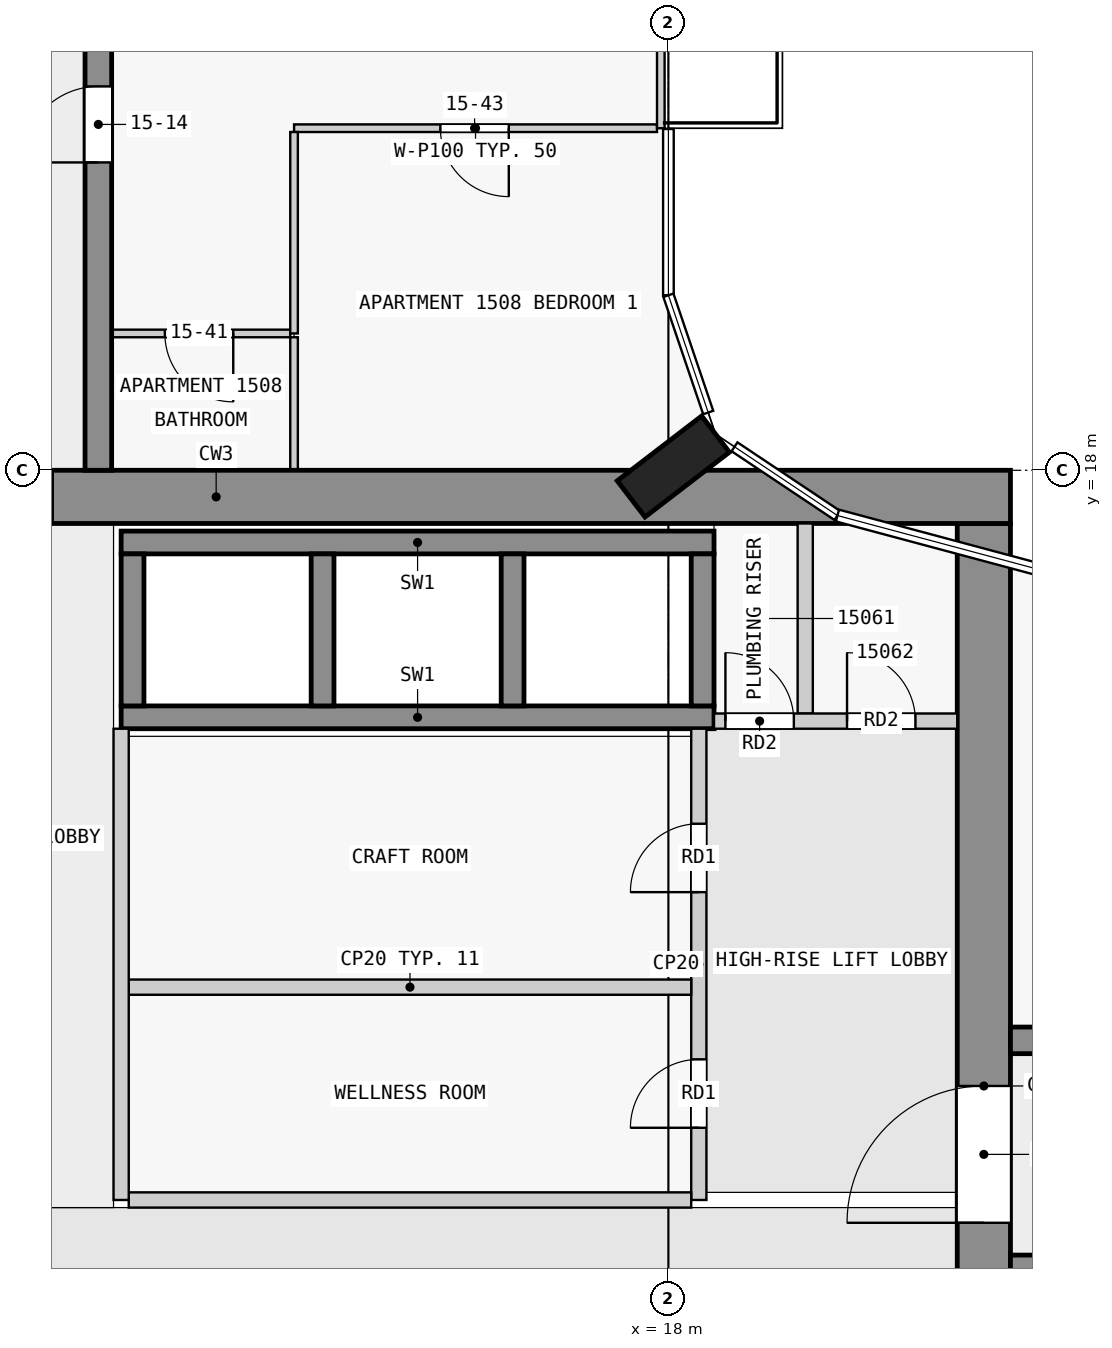
"""IFC4 building model, lengths in metres.
Left out: names, types, materials, properties, quantities, classifications, styles, units other than length and angle.
Written with IfcOpenShell. Run it as: python <this file> out.ifc"""

import sys

from ifc_helpers import new_model, si_unit, direction, frame, frame_2d, origin, origin_2d, place, context, subcontext, project, spatial, rectangle, extrude, element, fill, save


model = new_model("IFC4")
c1 = context("Model", 3, precision=1e-05, world=origin(), true_north=direction((0.0, 1.0)))
c2 = subcontext(c1, "Body", "Model", "MODEL_VIEW")
j1 = project(units=[si_unit("LENGTHUNIT", "METRE"), si_unit("PLANEANGLEUNIT", "RADIAN")], contexts=[c1])
p1 = place(None, origin())
s1 = spatial("IfcSite", under=j1, at=p1, CompositionType="ELEMENT")
p2 = place(p1, origin())
s2 = spatial("IfcBuilding", under=s1, at=p2, CompositionType="ELEMENT")
p3 = place(p2, frame((0.0, 0.0, 61.8)))
s3 = spatial("IfcBuildingStorey", under=s2, at=p3, CompositionType="ELEMENT", Elevation=61.8)
p4 = place(p3, frame((18.065, 18.05, 0.0), z_axis=(0.0, 0.0, 1.0), x_axis=(-0.608810846443, 0.793315418515, 0.0)))
e1 = element("IfcColumn", 1, at=p4, inside=s3, PredefinedType="COLUMN", context=c2, shape_type="SweptSolid", body=[
    extrude(rectangle(XDim=0.6, YDim=1.4, at=origin_2d()), origin(), (0.0, 0.0, 1.0), 3.5),
])
p5 = place(p3, frame((1.6, 17.65, 0.0), z_axis=(0.0, 0.0, 1.0), x_axis=(1.0, 0.0, 0.0)))
e2 = element("IfcWall", 2, at=p5, inside=s3, PredefinedType="SHEAR", context=c2, shape_type="SweptSolid", body=[
    extrude(rectangle(XDim=20.9, YDim=0.7, at=frame_2d((10.45, 0.0))), origin(), (0.0, 0.0, 1.0), 3.25),
])
p6 = place(p5, frame((6.5, 0.0, 0.0)))
e3 = element("IfcOpeningElement", 3, at=p6, cuts=e2, PredefinedType="OPENING", context=c2, shape_type="SweptSolid", body=[
    extrude(rectangle(XDim=1.8, YDim=2.1, at=frame_2d((0.9, 1.05))), frame((0.0, 0.36, 0.0), z_axis=(0.0, -1.0, 0.0), x_axis=(1.0, 0.0, 0.0)), (0.0, 0.0, 1.0), 0.72),
])
p7 = place(p3, frame((22.15, 2.5, 0.0), z_axis=(0.0, 0.0, 1.0), x_axis=(0.0, 1.0, 0.0)))
e4 = element("IfcWall", 4, at=p7, inside=s3, PredefinedType="SHEAR", context=c2, shape_type="SweptSolid", body=[
    extrude(rectangle(XDim=14.8, YDim=0.7, at=frame_2d((7.4, 0.0))), origin(), (0.0, 0.0, 1.0), 3.25),
])
p8 = place(p7, frame((5.6, 0.0, 0.0)))
e5 = element("IfcOpeningElement", 5, at=p8, cuts=e4, PredefinedType="OPENING", context=c2, shape_type="SweptSolid", body=[
    extrude(rectangle(XDim=1.8, YDim=2.1, at=frame_2d((0.9, 1.05))), frame((0.0, 0.36, 0.0), z_axis=(0.0, -1.0, 0.0), x_axis=(1.0, 0.0, 0.0)), (0.0, 0.0, 1.0), 0.72),
])
for number, where, z_axis, x_axis in (
    (6, (10.8, 17.05, 0.0), (0.0, 0.0, 1.0), (1.0, 0.0, 0.0)),
    (7, (10.8, 14.75, 0.0), (0.0, 0.0, 1.0), (1.0, 0.0, 0.0)),
):
    element("IfcWall", number, at=place(p3, frame(where, z_axis=z_axis, x_axis=x_axis)), inside=s3, PredefinedType="SHEAR", context=c2, shape_type="SweptSolid", body=[
        extrude(rectangle(XDim=7.8, YDim=0.3, at=frame_2d((3.9, 0.0))), origin(), (0.0, 0.0, 1.0), 3.25),
    ])
for number, where, z_axis, x_axis in (
    (8, (10.95, 14.9, 0.0), (0.0, 0.0, 1.0), (0.0, 1.0, 0.0)),
    (9, (13.45, 14.9, 0.0), (0.0, 0.0, 1.0), (0.0, 1.0, 0.0)),
    (10, (15.95, 14.9, 0.0), (0.0, 0.0, 1.0), (0.0, 1.0, 0.0)),
    (11, (18.45, 14.9, 0.0), (0.0, 0.0, 1.0), (0.0, 1.0, 0.0)),
):
    element("IfcWall", number, at=place(p3, frame(where, z_axis=z_axis, x_axis=x_axis)), inside=s3, PredefinedType="SHEAR", context=c2, shape_type="SweptSolid", body=[
        extrude(rectangle(XDim=2.0, YDim=0.3, at=frame_2d((1.0, 0.0))), origin(), (0.0, 0.0, 1.0), 3.25),
    ])
p9 = place(p3, frame((22.5, 7.5, 0.0), z_axis=(0.0, 0.0, 1.0), x_axis=(1.0, 0.0, 0.0)))
e12 = element("IfcWall", 12, at=p9, inside=s3, PredefinedType="SHEAR", context=c2, shape_type="SweptSolid", body=[
    extrude(rectangle(XDim=22.5, YDim=0.35, at=frame_2d((11.25, 0.0))), origin(), (0.0, 0.0, 1.0), 3.25),
])
p10 = place(p9, frame((1.75, 0.0, 0.0)))
e13 = element("IfcOpeningElement", 13, at=p10, cuts=e12, PredefinedType="OPENING", context=c2, shape_type="SweptSolid", body=[
    extrude(rectangle(XDim=1.0, YDim=2.1, at=frame_2d((0.5, 1.05))), frame((0.0, 0.185, 0.0), z_axis=(0.0, -1.0, 0.0), x_axis=(1.0, 0.0, 0.0)), (0.0, 0.0, 1.0), 0.37),
])
p11 = place(p9, frame((8.55, 0.0, 0.0)))
e14 = element("IfcOpeningElement", 14, at=p11, cuts=e12, PredefinedType="OPENING", context=c2, shape_type="SweptSolid", body=[
    extrude(rectangle(XDim=1.0, YDim=2.1, at=frame_2d((0.5, 1.05))), frame((0.0, 0.185, 0.0), z_axis=(0.0, -1.0, 0.0), x_axis=(1.0, 0.0, 0.0)), (0.0, 0.0, 1.0), 0.37),
])
p12 = place(p9, frame((15.25, 0.0, 0.0)))
e15 = element("IfcOpeningElement", 15, at=p12, cuts=e12, PredefinedType="OPENING", context=c2, shape_type="SweptSolid", body=[
    extrude(rectangle(XDim=1.0, YDim=2.1, at=frame_2d((0.5, 1.05))), frame((0.0, 0.185, 0.0), z_axis=(0.0, -1.0, 0.0), x_axis=(1.0, 0.0, 0.0)), (0.0, 0.0, 1.0), 0.37),
])
p13 = place(p9, frame((18.75, 0.0, 0.0)))
e16 = element("IfcOpeningElement", 16, at=p13, cuts=e12, PredefinedType="OPENING", context=c2, shape_type="SweptSolid", body=[
    extrude(rectangle(XDim=0.9, YDim=2.1, at=frame_2d((0.45, 1.05))), frame((0.0, 0.185, 0.0), z_axis=(0.0, -1.0, 0.0), x_axis=(1.0, 0.0, 0.0)), (0.0, 0.0, 1.0), 0.37),
])
p14 = place(p9, frame((20.95, 0.0, 0.0)))
e17 = element("IfcOpeningElement", 17, at=p14, cuts=e12, PredefinedType="OPENING", context=c2, shape_type="SweptSolid", body=[
    extrude(rectangle(XDim=1.0, YDim=2.1, at=frame_2d((0.5, 1.05))), frame((0.0, 0.185, 0.0), z_axis=(0.0, -1.0, 0.0), x_axis=(1.0, 0.0, 0.0)), (0.0, 0.0, 1.0), 0.37),
])
p15 = place(p3, frame((22.5, 10.5, 0.0), z_axis=(0.0, 0.0, 1.0), x_axis=(1.0, 0.0, 0.0)))
e18 = element("IfcWall", 18, at=p15, inside=s3, PredefinedType="SHEAR", context=c2, shape_type="SweptSolid", body=[
    extrude(rectangle(XDim=22.5, YDim=0.35, at=frame_2d((11.25, 0.0))), origin(), (0.0, 0.0, 1.0), 3.25),
])
p16 = place(p15, frame((1.75, 0.0, 0.0)))
e19 = element("IfcOpeningElement", 19, at=p16, cuts=e18, PredefinedType="OPENING", context=c2, shape_type="SweptSolid", body=[
    extrude(rectangle(XDim=1.0, YDim=2.1, at=frame_2d((0.5, 1.05))), frame((0.0, 0.185, 0.0), z_axis=(0.0, -1.0, 0.0), x_axis=(1.0, 0.0, 0.0)), (0.0, 0.0, 1.0), 0.37),
])
p17 = place(p15, frame((6.25, 0.0, 0.0)))
e20 = element("IfcOpeningElement", 20, at=p17, cuts=e18, PredefinedType="OPENING", context=c2, shape_type="SweptSolid", body=[
    extrude(rectangle(XDim=1.0, YDim=2.1, at=frame_2d((0.5, 1.05))), frame((0.0, 0.185, 0.0), z_axis=(0.0, -1.0, 0.0), x_axis=(1.0, 0.0, 0.0)), (0.0, 0.0, 1.0), 0.37),
])
p18 = place(p15, frame((10.75, 0.0, 0.0)))
e21 = element("IfcOpeningElement", 21, at=p18, cuts=e18, PredefinedType="OPENING", context=c2, shape_type="SweptSolid", body=[
    extrude(rectangle(XDim=1.0, YDim=2.1, at=frame_2d((0.5, 1.05))), frame((0.0, 0.185, 0.0), z_axis=(0.0, -1.0, 0.0), x_axis=(1.0, 0.0, 0.0)), (0.0, 0.0, 1.0), 0.37),
])
p19 = place(p15, frame((16.85, 0.0, 0.0)))
e22 = element("IfcOpeningElement", 22, at=p19, cuts=e18, PredefinedType="OPENING", context=c2, shape_type="SweptSolid", body=[
    extrude(rectangle(XDim=1.0, YDim=2.1, at=frame_2d((0.5, 1.05))), frame((0.0, 0.185, 0.0), z_axis=(0.0, -1.0, 0.0), x_axis=(1.0, 0.0, 0.0)), (0.0, 0.0, 1.0), 0.37),
])
p20 = place(p3, frame((10.5, 18.0, 0.0), z_axis=(0.0, 0.0, 1.0), x_axis=(0.0, 1.0, 0.0)))
e23 = element("IfcWall", 23, at=p20, inside=s3, PredefinedType="SHEAR", context=c2, shape_type="SweptSolid", body=[
    extrude(rectangle(XDim=27.0, YDim=0.35, at=frame_2d((13.5, 0.0))), origin(), (0.0, 0.0, 1.0), 3.25),
])
p21 = place(p20, frame((4.05, 0.0, 0.0)))
e24 = element("IfcOpeningElement", 24, at=p21, cuts=e23, PredefinedType="OPENING", context=c2, shape_type="SweptSolid", body=[
    extrude(rectangle(XDim=1.0, YDim=2.1, at=frame_2d((0.5, 1.05))), frame((0.0, 0.185, 0.0), z_axis=(0.0, -1.0, 0.0), x_axis=(1.0, 0.0, 0.0)), (0.0, 0.0, 1.0), 0.37),
])
p22 = place(p20, frame((10.75, 0.0, 0.0)))
e25 = element("IfcOpeningElement", 25, at=p22, cuts=e23, PredefinedType="OPENING", context=c2, shape_type="SweptSolid", body=[
    extrude(rectangle(XDim=1.0, YDim=2.1, at=frame_2d((0.5, 1.05))), frame((0.0, 0.185, 0.0), z_axis=(0.0, -1.0, 0.0), x_axis=(1.0, 0.0, 0.0)), (0.0, 0.0, 1.0), 0.37),
])
p23 = place(p20, frame((15.25, 0.0, 0.0)))
e26 = element("IfcOpeningElement", 26, at=p23, cuts=e23, PredefinedType="OPENING", context=c2, shape_type="SweptSolid", body=[
    extrude(rectangle(XDim=1.0, YDim=2.1, at=frame_2d((0.5, 1.05))), frame((0.0, 0.185, 0.0), z_axis=(0.0, -1.0, 0.0), x_axis=(1.0, 0.0, 0.0)), (0.0, 0.0, 1.0), 0.37),
])
p24 = place(p20, frame((19.75, 0.0, 0.0)))
e27 = element("IfcOpeningElement", 27, at=p24, cuts=e23, PredefinedType="OPENING", context=c2, shape_type="SweptSolid", body=[
    extrude(rectangle(XDim=1.0, YDim=2.1, at=frame_2d((0.5, 1.05))), frame((0.0, 0.185, 0.0), z_axis=(0.0, -1.0, 0.0), x_axis=(1.0, 0.0, 0.0)), (0.0, 0.0, 1.0), 0.37),
])
p25 = place(p20, frame((23.25, 0.0, 0.0)))
e28 = element("IfcOpeningElement", 28, at=p25, cuts=e23, PredefinedType="OPENING", context=c2, shape_type="SweptSolid", body=[
    extrude(rectangle(XDim=0.9, YDim=2.1, at=frame_2d((0.45, 1.05))), frame((0.0, 0.185, 0.0), z_axis=(0.0, -1.0, 0.0), x_axis=(1.0, 0.0, 0.0)), (0.0, 0.0, 1.0), 0.37),
])
p26 = place(p20, frame((25.45, 0.0, 0.0)))
e29 = element("IfcOpeningElement", 29, at=p26, cuts=e23, PredefinedType="OPENING", context=c2, shape_type="SweptSolid", body=[
    extrude(rectangle(XDim=1.0, YDim=2.1, at=frame_2d((0.5, 1.05))), frame((0.0, 0.185, 0.0), z_axis=(0.0, -1.0, 0.0), x_axis=(1.0, 0.0, 0.0)), (0.0, 0.0, 1.0), 0.37),
])
p27 = place(p3, frame((17.9, 27.0, 0.0), z_axis=(0.0, 0.0, 1.0), x_axis=(0.0, -1.0, 0.0)))
e30 = element("IfcWall", 30, at=p27, inside=s3, PredefinedType="STANDARD", context=c2, shape_type="SweptSolid", body=[
    extrude(rectangle(XDim=4.5, YDim=0.1, at=frame_2d((2.25, 0.0))), origin(), (0.0, 0.0, 1.0), 3.25),
])
p28 = place(p27, frame((1.05, 0.0, 0.0)))
e31 = element("IfcOpeningElement", 31, at=p28, cuts=e30, PredefinedType="OPENING", context=c2, shape_type="SweptSolid", body=[
    extrude(rectangle(XDim=2.4, YDim=2.4, at=frame_2d((1.2, 1.2))), frame((0.0, 0.06, 0.0), z_axis=(0.0, -1.0, 0.0), x_axis=(1.0, 0.0, 0.0)), (0.0, 0.0, 1.0), 0.12),
])
p29 = place(p3, frame((10.8, 8.4, 0.0), z_axis=(0.0, 0.0, 1.0), x_axis=(0.0, 1.0, 0.0)))
e32 = element("IfcWall", 32, at=p29, inside=s3, PredefinedType="PARTITIONING", context=c2, shape_type="SweptSolid", body=[
    extrude(rectangle(XDim=6.2, YDim=0.2, at=frame_2d((3.1, 0.0))), origin(), (0.0, 0.0, 1.0), 3.25),
])
p30 = place(p3, frame((10.9, 8.4, 0.0), z_axis=(0.0, 0.0, 1.0), x_axis=(1.0, 0.0, 0.0)))
e33 = element("IfcWall", 33, at=p30, inside=s3, PredefinedType="PARTITIONING", context=c2, shape_type="SweptSolid", body=[
    extrude(rectangle(XDim=7.4, YDim=0.2, at=frame_2d((3.7, 0.0))), origin(), (0.0, 0.0, 1.0), 3.25),
])
p31 = place(p3, frame((18.4, 8.4, 0.0), z_axis=(0.0, 0.0, 1.0), x_axis=(0.0, 1.0, 0.0)))
e34 = element("IfcWall", 34, at=p31, inside=s3, PredefinedType="PARTITIONING", context=c2, shape_type="SweptSolid", body=[
    extrude(rectangle(XDim=6.2, YDim=0.2, at=frame_2d((3.1, 0.0))), origin(), (0.0, 0.0, 1.0), 3.25),
])
p32 = place(p31, frame((0.95, 0.0, 0.0)))
e35 = element("IfcOpeningElement", 35, at=p32, cuts=e34, PredefinedType="OPENING", context=c2, shape_type="SweptSolid", body=[
    extrude(rectangle(XDim=0.9, YDim=2.1, at=frame_2d((0.45, 1.05))), frame((0.0, 0.11, 0.0), z_axis=(0.0, -1.0, 0.0), x_axis=(1.0, 0.0, 0.0)), (0.0, 0.0, 1.0), 0.22),
])
p33 = place(p31, frame((4.05, 0.0, 0.0)))
e36 = element("IfcOpeningElement", 36, at=p33, cuts=e34, PredefinedType="OPENING", context=c2, shape_type="SweptSolid", body=[
    extrude(rectangle(XDim=0.9, YDim=2.1, at=frame_2d((0.45, 1.05))), frame((0.0, 0.11, 0.0), z_axis=(0.0, -1.0, 0.0), x_axis=(1.0, 0.0, 0.0)), (0.0, 0.0, 1.0), 0.22),
])
p34 = place(p3, frame((10.9, 11.2, 0.0), z_axis=(0.0, 0.0, 1.0), x_axis=(1.0, 0.0, 0.0)))
e37 = element("IfcWall", 37, at=p34, inside=s3, PredefinedType="PARTITIONING", context=c2, shape_type="SweptSolid", body=[
    extrude(rectangle(XDim=7.4, YDim=0.2, at=frame_2d((3.7, 0.0))), origin(), (0.0, 0.0, 1.0), 3.25),
])
p35 = place(p3, frame((18.6, 14.7, 0.0), z_axis=(0.0, 0.0, 1.0), x_axis=(1.0, 0.0, 0.0)))
e38 = element("IfcWall", 38, at=p35, inside=s3, PredefinedType="PARTITIONING", context=c2, shape_type="SweptSolid", body=[
    extrude(rectangle(XDim=3.2, YDim=0.2, at=frame_2d((1.6, 0.0))), origin(), (0.0, 0.0, 1.0), 3.25),
])
p36 = place(p35, frame((0.15, 0.0, 0.0)))
e39 = element("IfcOpeningElement", 39, at=p36, cuts=e38, PredefinedType="OPENING", context=c2, shape_type="SweptSolid", body=[
    extrude(rectangle(XDim=0.9, YDim=2.1, at=frame_2d((0.45, 1.05))), frame((0.0, 0.11, 0.0), z_axis=(0.0, -1.0, 0.0), x_axis=(1.0, 0.0, 0.0)), (0.0, 0.0, 1.0), 0.22),
])
p37 = place(p35, frame((1.75, 0.0, 0.0)))
e40 = element("IfcOpeningElement", 40, at=p37, cuts=e38, PredefinedType="OPENING", context=c2, shape_type="SweptSolid", body=[
    extrude(rectangle(XDim=0.9, YDim=2.1, at=frame_2d((0.45, 1.05))), frame((0.0, 0.11, 0.0), z_axis=(0.0, -1.0, 0.0), x_axis=(1.0, 0.0, 0.0)), (0.0, 0.0, 1.0), 0.22),
])
p38 = place(p3, frame((19.8, 14.8, 0.0), z_axis=(0.0, 0.0, 1.0), x_axis=(0.0, 1.0, 0.0)))
e41 = element("IfcWall", 41, at=p38, inside=s3, PredefinedType="PARTITIONING", context=c2, shape_type="SweptSolid", body=[
    extrude(rectangle(XDim=2.5, YDim=0.2, at=frame_2d((1.25, 0.0))), origin(), (0.0, 0.0, 1.0), 3.25),
])
p39 = place(p3, frame((13.025, 19.8, 0.0), z_axis=(0.0, 0.0, 1.0), x_axis=(-1.0, 0.0, 0.0)))
e42 = element("IfcWall", 42, at=p39, inside=s3, PredefinedType="PARTITIONING", context=c2, shape_type="SweptSolid", body=[
    extrude(rectangle(XDim=2.35, YDim=0.1, at=frame_2d((1.175, 0.0))), origin(), (0.0, 0.0, 1.0), 3.25),
])
p40 = place(p39, frame((0.75, 0.0, 0.0)))
e43 = element("IfcOpeningElement", 43, at=p40, cuts=e42, PredefinedType="OPENING", context=c2, shape_type="SweptSolid", body=[
    extrude(rectangle(XDim=0.9, YDim=2.1, at=frame_2d((0.45, 1.05))), frame((0.0, 0.06, 0.0), z_axis=(0.0, -1.0, 0.0), x_axis=(1.0, 0.0, 0.0)), (0.0, 0.0, 1.0), 0.12),
])
p41 = place(p3, frame((17.85, 22.5, 0.0), z_axis=(0.0, 0.0, 1.0), x_axis=(-1.0, 0.0, 0.0)))
e44 = element("IfcWall", 44, at=p41, inside=s3, PredefinedType="PARTITIONING", context=c2, shape_type="SweptSolid", body=[
    extrude(rectangle(XDim=4.775, YDim=0.1, at=frame_2d((2.388, 0.0))), origin(), (0.0, 0.0, 1.0), 3.25),
])
p42 = place(p41, frame((1.95, 0.0, 0.0)))
e45 = element("IfcOpeningElement", 45, at=p42, cuts=e44, PredefinedType="OPENING", context=c2, shape_type="SweptSolid", body=[
    extrude(rectangle(XDim=0.9, YDim=2.1, at=frame_2d((0.45, 1.05))), frame((0.0, 0.06, 0.0), z_axis=(0.0, -1.0, 0.0), x_axis=(1.0, 0.0, 0.0)), (0.0, 0.0, 1.0), 0.12),
])
p43 = place(p3, frame((13.075, 22.45, 0.0), z_axis=(0.0, 0.0, 1.0), x_axis=(0.0, -1.0, 0.0)))
e46 = element("IfcWall", 46, at=p43, inside=s3, PredefinedType="PARTITIONING", context=c2, shape_type="SweptSolid", body=[
    extrude(rectangle(XDim=2.65, YDim=0.1, at=frame_2d((1.325, 0.0))), origin(), (0.0, 0.0, 1.0), 3.25),
])
p44 = place(p3, frame((13.075, 18.0, 0.0), z_axis=(0.0, 0.0, 1.0), x_axis=(0.0, 1.0, 0.0)))
e47 = element("IfcWall", 47, at=p44, inside=s3, PredefinedType="PARTITIONING", context=c2, shape_type="SweptSolid", body=[
    extrude(rectangle(XDim=1.75, YDim=0.1, at=frame_2d((0.875, 0.0))), origin(), (0.0, 0.0, 1.0), 3.25),
])
p45 = place(p32, origin())
e48 = element("IfcDoor", 48, at=p45, inside=s3, OperationType="SINGLE_SWING_LEFT", PredefinedType="DOOR", context=c2, shape_type="SweptSolid", body=[
    extrude(rectangle(XDim=0.9, YDim=2.1, at=frame_2d((0.45, 1.05))), frame((0.0, 0.025, 0.0), z_axis=(0.0, -1.0, 0.0), x_axis=(1.0, 0.0, 0.0)), (0.0, 0.0, 1.0), 0.05),
])
fill(e35, e48)
p46 = place(p33, origin())
e49 = element("IfcDoor", 49, at=p46, inside=s3, OperationType="SINGLE_SWING_LEFT", PredefinedType="DOOR", context=c2, shape_type="SweptSolid", body=[
    extrude(rectangle(XDim=0.9, YDim=2.1, at=frame_2d((0.45, 1.05))), frame((0.0, 0.025, 0.0), z_axis=(0.0, -1.0, 0.0), x_axis=(1.0, 0.0, 0.0)), (0.0, 0.0, 1.0), 0.05),
])
fill(e36, e49)
p47 = place(p8, origin())
e50 = element("IfcDoor", 50, at=p47, inside=s3, OperationType="DOUBLE_DOOR_SINGLE_SWING", PredefinedType="DOOR", context=c2, shape_type="SweptSolid", body=[
    extrude(rectangle(XDim=1.8, YDim=2.1, at=frame_2d((0.9, 1.05))), frame((0.0, 0.025, 0.0), z_axis=(0.0, -1.0, 0.0), x_axis=(1.0, 0.0, 0.0)), (0.0, 0.0, 1.0), 0.05),
])
fill(e5, e50)
p48 = place(p6, origin())
e51 = element("IfcDoor", 51, at=p48, inside=s3, OperationType="DOUBLE_DOOR_SINGLE_SWING", PredefinedType="DOOR", context=c2, shape_type="SweptSolid", body=[
    extrude(rectangle(XDim=1.8, YDim=2.1, at=frame_2d((0.9, 1.05))), frame((0.0, 0.025, 0.0), z_axis=(0.0, -1.0, 0.0), x_axis=(1.0, 0.0, 0.0)), (0.0, 0.0, 1.0), 0.05),
])
fill(e3, e51)
p49 = place(p36, origin())
e52 = element("IfcDoor", 52, at=p49, inside=s3, OperationType="SINGLE_SWING_LEFT", PredefinedType="DOOR", context=c2, shape_type="SweptSolid", body=[
    extrude(rectangle(XDim=0.9, YDim=2.1, at=frame_2d((0.45, 1.05))), frame((0.0, 0.025, 0.0), z_axis=(0.0, -1.0, 0.0), x_axis=(1.0, 0.0, 0.0)), (0.0, 0.0, 1.0), 0.05),
])
fill(e39, e52)
p50 = place(p37, origin())
e53 = element("IfcDoor", 53, at=p50, inside=s3, OperationType="SINGLE_SWING_LEFT", PredefinedType="DOOR", context=c2, shape_type="SweptSolid", body=[
    extrude(rectangle(XDim=0.9, YDim=2.1, at=frame_2d((0.45, 1.05))), frame((0.0, 0.025, 0.0), z_axis=(0.0, -1.0, 0.0), x_axis=(1.0, 0.0, 0.0)), (0.0, 0.0, 1.0), 0.05),
])
fill(e40, e53)
p51 = place(p21, origin())
e54 = element("IfcDoor", 54, at=p51, inside=s3, OperationType="SINGLE_SWING_LEFT", PredefinedType="DOOR", context=c2, shape_type="SweptSolid", body=[
    extrude(rectangle(XDim=1.0, YDim=2.1, at=frame_2d((0.5, 1.05))), frame((0.0, 0.025, 0.0), z_axis=(0.0, -1.0, 0.0), x_axis=(1.0, 0.0, 0.0)), (0.0, 0.0, 1.0), 0.05),
])
fill(e24, e54)
p52 = place(p40, origin())
e55 = element("IfcDoor", 55, at=p52, inside=s3, OperationType="SINGLE_SWING_RIGHT", PredefinedType="DOOR", context=c2, shape_type="SweptSolid", body=[
    extrude(rectangle(XDim=0.9, YDim=2.1, at=frame_2d((0.45, 1.05))), frame((0.0, 0.025, 0.0), z_axis=(0.0, -1.0, 0.0), x_axis=(1.0, 0.0, 0.0)), (0.0, 0.0, 1.0), 0.05),
])
fill(e43, e55)
p53 = place(p42, origin())
e56 = element("IfcDoor", 56, at=p53, inside=s3, OperationType="SINGLE_SWING_RIGHT", PredefinedType="DOOR", context=c2, shape_type="SweptSolid", body=[
    extrude(rectangle(XDim=0.9, YDim=2.1, at=frame_2d((0.45, 1.05))), frame((0.0, 0.025, 0.0), z_axis=(0.0, -1.0, 0.0), x_axis=(1.0, 0.0, 0.0)), (0.0, 0.0, 1.0), 0.05),
])
fill(e45, e56)
save(model, sys.argv[1])
